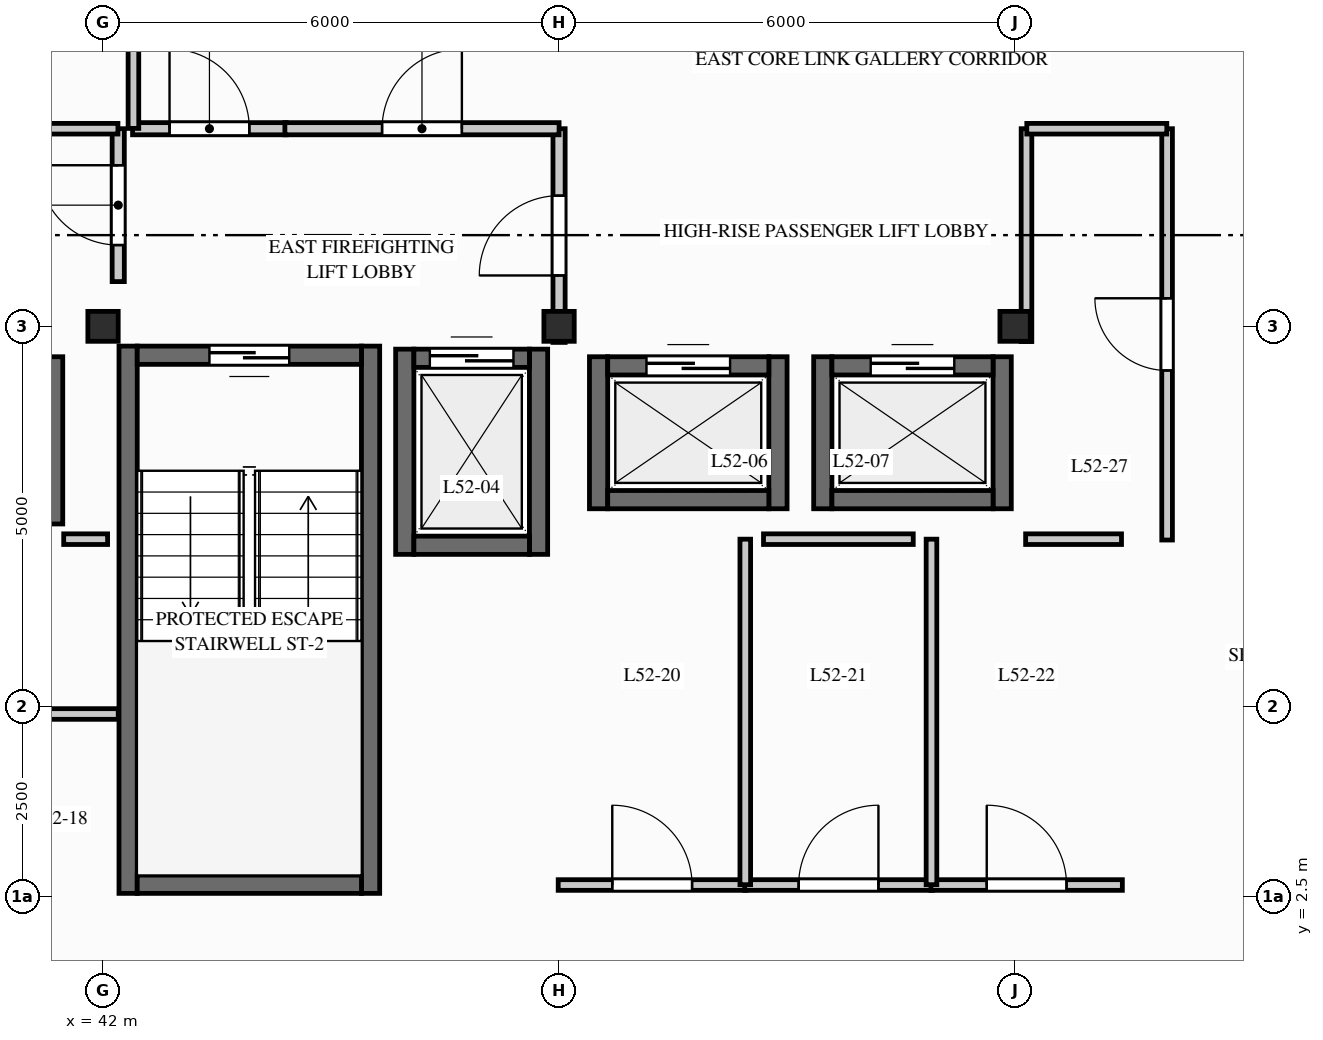
"""IFC4 building model, lengths in metres.
Left out: names, types, materials, properties, quantities, classifications, styles, units other than length and angle.
Written with IfcOpenShell. Run it as: python <this file> out.ifc"""

import sys

from ifc_helpers import new_model, si_unit, direction, frame, frame_2d, origin, origin_2d, place, context, subcontext, project, spatial, rectangle, i_section, extrude, element, fill, save


model = new_model("IFC4")
c1 = context("Model", 3, precision=1e-05, world=origin(), true_north=direction((0.0, 1.0)))
c2 = subcontext(c1, "Body", "Model", "MODEL_VIEW")
j1 = project(units=[si_unit("LENGTHUNIT", "METRE"), si_unit("PLANEANGLEUNIT", "RADIAN")], contexts=[c1])
p1 = place(None, origin())
s1 = spatial("IfcSite", under=j1, at=p1, CompositionType="ELEMENT")
p2 = place(p1, origin())
s2 = spatial("IfcBuilding", under=s1, at=p2, CompositionType="ELEMENT")
p3 = place(p2, frame((0.0, 0.0, 172.8)))
s3 = spatial("IfcBuildingStorey", under=s2, at=p3, CompositionType="ELEMENT", Elevation=172.8)
for number, where, z_axis, x_axis in (
    (1, (42.0, 10.0, 0.0), (0.0, 0.0, 1.0), (1.0, 0.0, 0.0)),
    (2, (48.0, 10.0, 0.0), (0.0, 0.0, 1.0), (1.0, 0.0, 0.0)),
    (3, (54.0, 10.0, 0.0), (0.0, 0.0, 1.0), (1.0, 0.0, 0.0)),
):
    element("IfcColumn", number, at=place(p3, frame(where, z_axis=z_axis, x_axis=x_axis)), inside=s3, PredefinedType="COLUMN", context=c2, shape_type="SweptSolid", body=[
        extrude(i_section(OverallWidth=0.399, OverallDepth=0.394, WebThickness=0.023, FlangeThickness=0.037, FilletRadius=0.015, at=origin_2d()), origin(), (0.0, 0.0, 1.0), 3.1),
    ])
for number, where, z_axis, x_axis in (
    (4, (42.33, 2.54, 0.0), (0.0, 0.0, 1.0), (0.0, 1.0, 0.0)),
    (5, (45.52, 2.54, 0.0), (0.0, 0.0, 1.0), (0.0, 1.0, 0.0)),
):
    element("IfcWall", number, at=place(p3, frame(where, z_axis=z_axis, x_axis=x_axis)), inside=s3, PredefinedType="SHEAR", context=c2, shape_type="SweptSolid", body=[
        extrude(rectangle(XDim=7.2, YDim=0.24, at=frame_2d((3.6, 0.0))), origin(), (0.0, 0.0, 1.0), 2.89),
    ])
p4 = place(p3, frame((42.45, 2.66, 0.0), z_axis=(0.0, 0.0, 1.0), x_axis=(1.0, 0.0, 0.0)))
e6 = element("IfcWall", 6, at=p4, inside=s3, PredefinedType="SHEAR", context=c2, shape_type="SweptSolid", body=[
    extrude(rectangle(XDim=2.95, YDim=0.24, at=frame_2d((1.475, 0.0))), origin(), (0.0, 0.0, 1.0), 2.89),
])
p5 = place(p3, frame((45.4, 9.62, 0.0), z_axis=(0.0, 0.0, 1.0), x_axis=(-1.0, 0.0, 0.0)))
e7 = element("IfcWall", 7, at=p5, inside=s3, PredefinedType="SHEAR", context=c2, shape_type="SweptSolid", body=[
    extrude(rectangle(XDim=2.95, YDim=0.24, at=frame_2d((1.475, 0.0))), origin(), (0.0, 0.0, 1.0), 2.89),
])
p6 = place(p5, frame((0.95, 0.0, 0.0)))
e8 = element("IfcOpeningElement", 8, at=p6, cuts=e7, PredefinedType="OPENING", context=c2, shape_type="SweptSolid", body=[
    extrude(rectangle(XDim=1.05, YDim=2.06, at=frame_2d((0.525, 1.03))), frame((0.0, 0.13, 0.0), z_axis=(0.0, -1.0, 0.0), x_axis=(1.0, 0.0, 0.0)), (0.0, 0.0, 1.0), 0.26),
])
for number, where, z_axis, x_axis in (
    (9, (45.97, 7.0, 0.0), (0.0, 0.0, 1.0), (0.0, 1.0, 0.0)),
    (10, (47.73, 7.0, 0.0), (0.0, 0.0, 1.0), (0.0, 1.0, 0.0)),
):
    element("IfcWall", number, at=place(p3, frame(where, z_axis=z_axis, x_axis=x_axis)), inside=s3, PredefinedType="SHEAR", context=c2, shape_type="SweptSolid", body=[
        extrude(rectangle(XDim=2.7, YDim=0.24, at=frame_2d((1.35, 0.0))), origin(), (0.0, 0.0, 1.0), 2.89),
    ])
p7 = place(p3, frame((46.09, 7.12, 0.0), z_axis=(0.0, 0.0, 1.0), x_axis=(1.0, 0.0, 0.0)))
e11 = element("IfcWall", 11, at=p7, inside=s3, PredefinedType="SHEAR", context=c2, shape_type="SweptSolid", body=[
    extrude(rectangle(XDim=1.52, YDim=0.24, at=frame_2d((0.76, 0.0))), origin(), (0.0, 0.0, 1.0), 2.89),
])
p8 = place(p3, frame((46.09, 9.58, 0.0), z_axis=(0.0, 0.0, 1.0), x_axis=(1.0, 0.0, 0.0)))
e12 = element("IfcWall", 12, at=p8, inside=s3, PredefinedType="SHEAR", context=c2, shape_type="SweptSolid", body=[
    extrude(rectangle(XDim=1.52, YDim=0.24, at=frame_2d((0.76, 0.0))), origin(), (0.0, 0.0, 1.0), 2.89),
])
p9 = place(p8, frame((0.21, 0.0, 0.0)))
e13 = element("IfcOpeningElement", 13, at=p9, cuts=e12, PredefinedType="OPENING", context=c2, shape_type="SweptSolid", body=[
    extrude(rectangle(XDim=1.1, YDim=2.06, at=frame_2d((0.55, 1.03))), frame((0.0, 0.13, 0.0), z_axis=(0.0, -1.0, 0.0), x_axis=(1.0, 0.0, 0.0)), (0.0, 0.0, 1.0), 0.26),
])
p10 = place(p3, frame((41.35, 7.4, 0.0), z_axis=(0.0, 0.0, 1.0), x_axis=(0.0, 1.0, 0.0)))
e14 = element("IfcWall", 14, at=p10, inside=s3, PredefinedType="SHEAR", context=c2, shape_type="SweptSolid", body=[
    extrude(rectangle(XDim=2.2, YDim=0.24, at=frame_2d((1.1, 0.0))), origin(), (0.0, 0.0, 1.0), 2.89),
])
for number, where, z_axis, x_axis in (
    (15, (48.52, 7.6, 0.0), (0.0, 0.0, 1.0), (0.0, 1.0, 0.0)),
    (16, (50.88, 7.6, 0.0), (0.0, 0.0, 1.0), (0.0, 1.0, 0.0)),
):
    element("IfcWall", number, at=place(p3, frame(where, z_axis=z_axis, x_axis=x_axis)), inside=s3, PredefinedType="SHEAR", context=c2, shape_type="SweptSolid", body=[
        extrude(rectangle(XDim=2.0, YDim=0.24, at=frame_2d((1.0, 0.0))), origin(), (0.0, 0.0, 1.0), 2.89),
    ])
p11 = place(p3, frame((48.64, 7.72, 0.0), z_axis=(0.0, 0.0, 1.0), x_axis=(1.0, 0.0, 0.0)))
e17 = element("IfcWall", 17, at=p11, inside=s3, PredefinedType="SHEAR", context=c2, shape_type="SweptSolid", body=[
    extrude(rectangle(XDim=2.12, YDim=0.24, at=frame_2d((1.06, 0.0))), origin(), (0.0, 0.0, 1.0), 2.89),
])
p12 = place(p3, frame((48.64, 9.48, 0.0), z_axis=(0.0, 0.0, 1.0), x_axis=(1.0, 0.0, 0.0)))
e18 = element("IfcWall", 18, at=p12, inside=s3, PredefinedType="SHEAR", context=c2, shape_type="SweptSolid", body=[
    extrude(rectangle(XDim=2.12, YDim=0.24, at=frame_2d((1.06, 0.0))), origin(), (0.0, 0.0, 1.0), 2.89),
])
p13 = place(p12, frame((0.51, 0.0, 0.0)))
e19 = element("IfcOpeningElement", 19, at=p13, cuts=e18, PredefinedType="OPENING", context=c2, shape_type="SweptSolid", body=[
    extrude(rectangle(XDim=1.1, YDim=2.06, at=frame_2d((0.55, 1.03))), frame((0.0, 0.13, 0.0), z_axis=(0.0, -1.0, 0.0), x_axis=(1.0, 0.0, 0.0)), (0.0, 0.0, 1.0), 0.26),
])
for number, where, z_axis, x_axis in (
    (20, (51.47, 7.6, 0.0), (0.0, 0.0, 1.0), (0.0, 1.0, 0.0)),
    (21, (53.83, 7.6, 0.0), (0.0, 0.0, 1.0), (0.0, 1.0, 0.0)),
):
    element("IfcWall", number, at=place(p3, frame(where, z_axis=z_axis, x_axis=x_axis)), inside=s3, PredefinedType="SHEAR", context=c2, shape_type="SweptSolid", body=[
        extrude(rectangle(XDim=2.0, YDim=0.24, at=frame_2d((1.0, 0.0))), origin(), (0.0, 0.0, 1.0), 2.89),
    ])
p14 = place(p3, frame((51.59, 7.72, 0.0), z_axis=(0.0, 0.0, 1.0), x_axis=(1.0, 0.0, 0.0)))
e22 = element("IfcWall", 22, at=p14, inside=s3, PredefinedType="SHEAR", context=c2, shape_type="SweptSolid", body=[
    extrude(rectangle(XDim=2.12, YDim=0.24, at=frame_2d((1.06, 0.0))), origin(), (0.0, 0.0, 1.0), 2.89),
])
p15 = place(p3, frame((51.59, 9.48, 0.0), z_axis=(0.0, 0.0, 1.0), x_axis=(1.0, 0.0, 0.0)))
e23 = element("IfcWall", 23, at=p15, inside=s3, PredefinedType="SHEAR", context=c2, shape_type="SweptSolid", body=[
    extrude(rectangle(XDim=2.12, YDim=0.24, at=frame_2d((1.06, 0.0))), origin(), (0.0, 0.0, 1.0), 2.89),
])
p16 = place(p15, frame((0.51, 0.0, 0.0)))
e24 = element("IfcOpeningElement", 24, at=p16, cuts=e23, PredefinedType="OPENING", context=c2, shape_type="SweptSolid", body=[
    extrude(rectangle(XDim=1.1, YDim=2.06, at=frame_2d((0.55, 1.03))), frame((0.0, 0.13, 0.0), z_axis=(0.0, -1.0, 0.0), x_axis=(1.0, 0.0, 0.0)), (0.0, 0.0, 1.0), 0.26),
])
p17 = place(p3, frame((56.0, 7.189, 0.0), z_axis=(0.0, 0.0, 1.0), x_axis=(0.0, 1.0, 0.0)))
e25 = element("IfcWall", 25, at=p17, inside=s3, PredefinedType="PARTITIONING", context=c2, shape_type="SweptSolid", body=[
    extrude(rectangle(XDim=5.411, YDim=0.14, at=frame_2d((2.706, 0.0))), origin(), (0.0, 0.0, 1.0), 2.253),
])
p18 = place(p17, frame((2.231, 0.0, 0.0)))
e26 = element("IfcOpeningElement", 26, at=p18, cuts=e25, PredefinedType="OPENING", context=c2, shape_type="SweptSolid", body=[
    extrude(rectangle(XDim=0.95, YDim=2.05, at=frame_2d((0.475, 1.025))), frame((0.0, 0.08, 0.0), z_axis=(0.0, -1.0, 0.0), x_axis=(1.0, 0.0, 0.0)), (0.0, 0.0, 1.0), 0.16),
])
p19 = place(p3, frame((47.989, 2.65, 0.0), z_axis=(0.0, 0.0, 1.0), x_axis=(1.0, 0.0, 0.0)))
e27 = element("IfcWall", 27, at=p19, inside=s3, PredefinedType="PARTITIONING", context=c2, shape_type="SweptSolid", body=[
    extrude(rectangle(XDim=2.472, YDim=0.14, at=frame_2d((1.236, 0.0))), origin(), (0.0, 0.0, 1.0), 2.253),
])
p20 = place(p19, frame((0.711, 0.0, 0.0)))
e28 = element("IfcOpeningElement", 28, at=p20, cuts=e27, PredefinedType="OPENING", context=c2, shape_type="SweptSolid", body=[
    extrude(rectangle(XDim=1.05, YDim=2.06, at=frame_2d((0.525, 1.03))), frame((0.0, 0.08, 0.0), z_axis=(0.0, -1.0, 0.0), x_axis=(1.0, 0.0, 0.0)), (0.0, 0.0, 1.0), 0.16),
])
p21 = place(p3, frame((50.443, 2.65, 0.0), z_axis=(0.0, 0.0, 1.0), x_axis=(1.0, 0.0, 0.0)))
e29 = element("IfcWall", 29, at=p21, inside=s3, PredefinedType="PARTITIONING", context=c2, shape_type="SweptSolid", body=[
    extrude(rectangle(XDim=2.469, YDim=0.14, at=frame_2d((1.234, 0.0))), origin(), (0.0, 0.0, 1.0), 2.89),
])
p22 = place(p21, frame((0.709, 0.0, 0.0)))
e30 = element("IfcOpeningElement", 30, at=p22, cuts=e29, PredefinedType="OPENING", context=c2, shape_type="SweptSolid", body=[
    extrude(rectangle(XDim=1.05, YDim=2.06, at=frame_2d((0.525, 1.03))), frame((0.0, 0.08, 0.0), z_axis=(0.0, -1.0, 0.0), x_axis=(1.0, 0.0, 0.0)), (0.0, 0.0, 1.0), 0.16),
])
p23 = place(p3, frame((52.893, 2.65, 0.0), z_axis=(0.0, 0.0, 1.0), x_axis=(1.0, 0.0, 0.0)))
e31 = element("IfcWall", 31, at=p23, inside=s3, PredefinedType="PARTITIONING", context=c2, shape_type="SweptSolid", body=[
    extrude(rectangle(XDim=2.519, YDim=0.14, at=frame_2d((1.259, 0.0))), origin(), (0.0, 0.0, 1.0), 2.253),
])
p24 = place(p23, frame((0.734, 0.0, 0.0)))
e32 = element("IfcOpeningElement", 32, at=p24, cuts=e31, PredefinedType="OPENING", context=c2, shape_type="SweptSolid", body=[
    extrude(rectangle(XDim=1.05, YDim=2.06, at=frame_2d((0.525, 1.03))), frame((0.0, 0.08, 0.0), z_axis=(0.0, -1.0, 0.0), x_axis=(1.0, 0.0, 0.0)), (0.0, 0.0, 1.0), 0.16),
])
p25 = place(p3, frame((38.454, 4.9, 0.0), z_axis=(0.0, 0.0, 1.0), x_axis=(1.0, 0.0, 0.0)))
e33 = element("IfcWall", 33, at=p25, inside=s3, PredefinedType="PARTITIONING", context=c2, shape_type="SweptSolid", body=[
    extrude(rectangle(XDim=3.746, YDim=0.14, at=frame_2d((1.873, 0.0))), origin(), (0.0, 0.0, 1.0), 2.253),
])
p26 = place(p25, frame((1.348, 0.0, 0.0)))
e34 = element("IfcOpeningElement", 34, at=p26, cuts=e33, PredefinedType="OPENING", context=c2, shape_type="SweptSolid", body=[
    extrude(rectangle(XDim=1.05, YDim=2.06, at=frame_2d((0.525, 1.03))), frame((0.0, 0.08, 0.0), z_axis=(0.0, -1.0, 0.0), x_axis=(1.0, 0.0, 0.0)), (0.0, 0.0, 1.0), 0.16),
])
for number, where, z_axis, x_axis in (
    (35, (50.45, 2.654, 0.0), (0.0, 0.0, 1.0), (0.0, 1.0, 0.0)),
    (36, (52.9, 2.654, 0.0), (0.0, 0.0, 1.0), (0.0, 1.0, 0.0)),
):
    element("IfcWall", number, at=place(p3, frame(where, z_axis=z_axis, x_axis=x_axis)), inside=s3, PredefinedType="PARTITIONING", context=c2, shape_type="SweptSolid", body=[
        extrude(rectangle(XDim=4.546, YDim=0.14, at=frame_2d((2.273, 0.0))), origin(), (0.0, 0.0, 1.0), 2.89),
    ])
p27 = place(p3, frame((54.139, 7.2, 0.0), z_axis=(0.0, 0.0, 1.0), x_axis=(1.0, 0.0, 0.0)))
e37 = element("IfcWall", 37, at=p27, inside=s3, PredefinedType="PARTITIONING", context=c2, shape_type="SweptSolid", body=[
    extrude(rectangle(XDim=1.261, YDim=0.14, at=frame_2d((0.631, 0.0))), origin(), (0.0, 0.0, 1.0), 2.253),
])
p28 = place(p3, frame((48.0, 9.789, 0.0), z_axis=(0.0, 0.0, 1.0), x_axis=(0.0, 1.0, 0.0)))
e38 = element("IfcWall", 38, at=p28, inside=s3, PredefinedType="PARTITIONING", context=c2, shape_type="SweptSolid", body=[
    extrude(rectangle(XDim=2.811, YDim=0.16, at=frame_2d((1.406, 0.0))), origin(), (0.0, 0.0, 1.0), 2.253),
])
p29 = place(p28, frame((0.881, 0.0, 0.0)))
e39 = element("IfcOpeningElement", 39, at=p29, cuts=e38, PredefinedType="OPENING", context=c2, shape_type="SweptSolid", body=[
    extrude(rectangle(XDim=1.05, YDim=2.06, at=frame_2d((0.525, 1.03))), frame((0.0, 0.09, 0.0), z_axis=(0.0, -1.0, 0.0), x_axis=(1.0, 0.0, 0.0)), (0.0, 0.0, 1.0), 0.18),
])
p30 = place(p3, frame((42.2, 10.589, 0.0), z_axis=(0.0, 0.0, 1.0), x_axis=(0.0, 1.0, 0.0)))
e40 = element("IfcWall", 40, at=p30, inside=s3, PredefinedType="PARTITIONING", context=c2, shape_type="SweptSolid", body=[
    extrude(rectangle(XDim=2.011, YDim=0.16, at=frame_2d((1.006, 0.0))), origin(), (0.0, 0.0, 1.0), 2.253),
])
p31 = place(p30, frame((0.481, 0.0, 0.0)))
e41 = element("IfcOpeningElement", 41, at=p31, cuts=e40, PredefinedType="OPENING", context=c2, shape_type="SweptSolid", body=[
    extrude(rectangle(XDim=1.05, YDim=2.06, at=frame_2d((0.525, 1.03))), frame((0.0, 0.09, 0.0), z_axis=(0.0, -1.0, 0.0), x_axis=(1.0, 0.0, 0.0)), (0.0, 0.0, 1.0), 0.18),
])
p32 = place(p3, frame((42.389, 12.6, 0.0), z_axis=(0.0, 0.0, 1.0), x_axis=(1.0, 0.0, 0.0)))
e42 = element("IfcWall", 42, at=p32, inside=s3, PredefinedType="PARTITIONING", context=c2, shape_type="SweptSolid", body=[
    extrude(rectangle(XDim=2.023, YDim=0.16, at=frame_2d((1.011, 0.0))), origin(), (0.0, 0.0, 1.0), 2.89),
])
p33 = place(p32, frame((0.486, 0.0, 0.0)))
e43 = element("IfcOpeningElement", 43, at=p33, cuts=e42, PredefinedType="OPENING", context=c2, shape_type="SweptSolid", body=[
    extrude(rectangle(XDim=1.05, YDim=2.06, at=frame_2d((0.525, 1.03))), frame((0.0, 0.09, 0.0), z_axis=(0.0, -1.0, 0.0), x_axis=(1.0, 0.0, 0.0)), (0.0, 0.0, 1.0), 0.18),
])
p34 = place(p3, frame((44.393, 12.6, 0.0), z_axis=(0.0, 0.0, 1.0), x_axis=(1.0, 0.0, 0.0)))
e44 = element("IfcWall", 44, at=p34, inside=s3, PredefinedType="PARTITIONING", context=c2, shape_type="SweptSolid", body=[
    extrude(rectangle(XDim=3.607, YDim=0.16, at=frame_2d((1.804, 0.0))), origin(), (0.0, 0.0, 1.0), 2.253),
])
p35 = place(p34, frame((1.279, 0.0, 0.0)))
e45 = element("IfcOpeningElement", 45, at=p35, cuts=e44, PredefinedType="OPENING", context=c2, shape_type="SweptSolid", body=[
    extrude(rectangle(XDim=1.05, YDim=2.06, at=frame_2d((0.525, 1.03))), frame((0.0, 0.09, 0.0), z_axis=(0.0, -1.0, 0.0), x_axis=(1.0, 0.0, 0.0)), (0.0, 0.0, 1.0), 0.18),
])
p36 = place(p3, frame((54.15, 9.8, 0.0), z_axis=(0.0, 0.0, 1.0), x_axis=(0.0, 1.0, 0.0)))
e46 = element("IfcWall", 46, at=p36, inside=s3, PredefinedType="PARTITIONING", context=c2, shape_type="SweptSolid", body=[
    extrude(rectangle(XDim=2.8, YDim=0.14, at=frame_2d((1.4, 0.0))), origin(), (0.0, 0.0, 1.0), 2.253),
])
p37 = place(p3, frame((54.154, 12.6, 0.0), z_axis=(0.0, 0.0, 1.0), x_axis=(1.0, 0.0, 0.0)))
e47 = element("IfcWall", 47, at=p37, inside=s3, PredefinedType="PARTITIONING", context=c2, shape_type="SweptSolid", body=[
    extrude(rectangle(XDim=1.842, YDim=0.14, at=frame_2d((0.921, 0.0))), origin(), (0.0, 0.0, 1.0), 2.89),
])
p38 = place(p3, frame((38.439, 12.6, 0.0), z_axis=(0.0, 0.0, 1.0), x_axis=(1.0, 0.0, 0.0)))
e48 = element("IfcWall", 48, at=p38, inside=s3, PredefinedType="PARTITIONING", context=c2, shape_type="SweptSolid", body=[
    extrude(rectangle(XDim=3.757, YDim=0.14, at=frame_2d((1.879, 0.0))), origin(), (0.0, 0.0, 1.0), 2.253),
])
p39 = place(p38, frame((1.404, 0.0, 0.0)))
e49 = element("IfcOpeningElement", 49, at=p39, cuts=e48, PredefinedType="OPENING", context=c2, shape_type="SweptSolid", body=[
    extrude(rectangle(XDim=0.95, YDim=2.05, at=frame_2d((0.475, 1.025))), frame((0.0, 0.08, 0.0), z_axis=(0.0, -1.0, 0.0), x_axis=(1.0, 0.0, 0.0)), (0.0, 0.0, 1.0), 0.16),
])
p40 = place(p3, frame((42.4, 12.604, 0.0), z_axis=(0.0, 0.0, 1.0), x_axis=(0.0, 1.0, 0.0)))
e50 = element("IfcWall", 50, at=p40, inside=s3, PredefinedType="PARTITIONING", context=c2, shape_type="SweptSolid", body=[
    extrude(rectangle(XDim=10.896, YDim=0.14, at=frame_2d((5.448, 0.0))), origin(), (0.0, 0.0, 1.0), 2.253),
])
p41 = place(p3, frame((41.483, 7.2, 0.0), z_axis=(0.0, 0.0, 1.0), x_axis=(1.0, 0.0, 0.0)))
e51 = element("IfcWall", 51, at=p41, inside=s3, PredefinedType="PARTITIONING", context=c2, shape_type="SweptSolid", body=[
    extrude(rectangle(XDim=0.577, YDim=0.14, at=frame_2d((0.289, 0.0))), origin(), (0.0, 0.0, 1.0), 2.253),
])
p42 = place(p3, frame((50.69, 7.2, 0.0), z_axis=(0.0, 0.0, 1.0), x_axis=(1.0, 0.0, 0.0)))
e52 = element("IfcWall", 52, at=p42, inside=s3, PredefinedType="PARTITIONING", context=c2, shape_type="SweptSolid", body=[
    extrude(rectangle(XDim=1.97, YDim=0.14, at=frame_2d((0.985, 0.0))), origin(), (0.0, 0.0, 1.0), 2.89),
])
p43 = place(p6, origin())
e53 = element("IfcDoor", 53, at=p43, inside=s3, OperationType="SINGLE_SWING_LEFT", PredefinedType="DOOR", context=c2, shape_type="SweptSolid", body=[
    extrude(rectangle(XDim=1.05, YDim=2.06, at=frame_2d((0.525, 1.03))), frame((0.0, 0.025, 0.0), z_axis=(0.0, -1.0, 0.0), x_axis=(1.0, 0.0, 0.0)), (0.0, 0.0, 1.0), 0.05),
])
fill(e8, e53)
p44 = place(p9, origin())
e54 = element("IfcDoor", 54, at=p44, inside=s3, OperationType="SLIDING_TO_LEFT", PredefinedType="DOOR", context=c2, shape_type="SweptSolid", body=[
    extrude(rectangle(XDim=1.1, YDim=2.06, at=frame_2d((0.55, 1.03))), frame((0.0, 0.025, 0.0), z_axis=(0.0, -1.0, 0.0), x_axis=(1.0, 0.0, 0.0)), (0.0, 0.0, 1.0), 0.05),
])
fill(e13, e54)
p45 = place(p13, origin())
e55 = element("IfcDoor", 55, at=p45, inside=s3, OperationType="SLIDING_TO_LEFT", PredefinedType="DOOR", context=c2, shape_type="SweptSolid", body=[
    extrude(rectangle(XDim=1.1, YDim=2.06, at=frame_2d((0.55, 1.03))), frame((0.0, 0.025, 0.0), z_axis=(0.0, -1.0, 0.0), x_axis=(1.0, 0.0, 0.0)), (0.0, 0.0, 1.0), 0.05),
])
fill(e19, e55)
p46 = place(p16, origin())
e56 = element("IfcDoor", 56, at=p46, inside=s3, OperationType="SLIDING_TO_RIGHT", PredefinedType="DOOR", context=c2, shape_type="SweptSolid", body=[
    extrude(rectangle(XDim=1.1, YDim=2.06, at=frame_2d((0.55, 1.03))), frame((0.0, 0.025, 0.0), z_axis=(0.0, -1.0, 0.0), x_axis=(1.0, 0.0, 0.0)), (0.0, 0.0, 1.0), 0.05),
])
fill(e24, e56)
p47 = place(p18, origin())
e57 = element("IfcDoor", 57, at=p47, inside=s3, OperationType="SINGLE_SWING_RIGHT", PredefinedType="DOOR", context=c2, shape_type="SweptSolid", body=[
    extrude(rectangle(XDim=0.95, YDim=2.05, at=frame_2d((0.475, 1.025))), frame((0.0, 0.025, 0.0), z_axis=(0.0, -1.0, 0.0), x_axis=(1.0, 0.0, 0.0)), (0.0, 0.0, 1.0), 0.05),
])
fill(e26, e57)
p48 = place(p20, origin())
e58 = element("IfcDoor", 58, at=p48, inside=s3, OperationType="SINGLE_SWING_LEFT", PredefinedType="DOOR", context=c2, shape_type="SweptSolid", body=[
    extrude(rectangle(XDim=1.05, YDim=2.06, at=frame_2d((0.525, 1.03))), frame((0.0, 0.025, 0.0), z_axis=(0.0, -1.0, 0.0), x_axis=(1.0, 0.0, 0.0)), (0.0, 0.0, 1.0), 0.05),
])
fill(e28, e58)
p49 = place(p22, origin())
e59 = element("IfcDoor", 59, at=p49, inside=s3, OperationType="SINGLE_SWING_RIGHT", PredefinedType="DOOR", context=c2, shape_type="SweptSolid", body=[
    extrude(rectangle(XDim=1.05, YDim=2.06, at=frame_2d((0.525, 1.03))), frame((0.0, 0.025, 0.0), z_axis=(0.0, -1.0, 0.0), x_axis=(1.0, 0.0, 0.0)), (0.0, 0.0, 1.0), 0.05),
])
fill(e30, e59)
p50 = place(p24, origin())
e60 = element("IfcDoor", 60, at=p50, inside=s3, OperationType="SINGLE_SWING_LEFT", PredefinedType="DOOR", context=c2, shape_type="SweptSolid", body=[
    extrude(rectangle(XDim=1.05, YDim=2.06, at=frame_2d((0.525, 1.03))), frame((0.0, 0.025, 0.0), z_axis=(0.0, -1.0, 0.0), x_axis=(1.0, 0.0, 0.0)), (0.0, 0.0, 1.0), 0.05),
])
fill(e32, e60)
p51 = place(p29, origin())
e61 = element("IfcDoor", 61, at=p51, inside=s3, OperationType="SINGLE_SWING_LEFT", PredefinedType="DOOR", context=c2, shape_type="SweptSolid", body=[
    extrude(rectangle(XDim=1.05, YDim=2.06, at=frame_2d((0.525, 1.03))), frame((0.0, 0.025, 0.0), z_axis=(0.0, -1.0, 0.0), x_axis=(1.0, 0.0, 0.0)), (0.0, 0.0, 1.0), 0.05),
])
fill(e39, e61)
p52 = place(p31, origin())
e62 = element("IfcDoor", 62, at=p52, inside=s3, OperationType="SINGLE_SWING_RIGHT", PredefinedType="DOOR", context=c2, shape_type="SweptSolid", body=[
    extrude(rectangle(XDim=1.05, YDim=2.06, at=frame_2d((0.525, 1.03))), frame((0.0, 0.025, 0.0), z_axis=(0.0, -1.0, 0.0), x_axis=(1.0, 0.0, 0.0)), (0.0, 0.0, 1.0), 0.05),
])
fill(e41, e62)
p53 = place(p33, origin())
e63 = element("IfcDoor", 63, at=p53, inside=s3, OperationType="SINGLE_SWING_LEFT", PredefinedType="DOOR", context=c2, shape_type="SweptSolid", body=[
    extrude(rectangle(XDim=1.05, YDim=2.06, at=frame_2d((0.525, 1.03))), frame((0.0, 0.025, 0.0), z_axis=(0.0, -1.0, 0.0), x_axis=(1.0, 0.0, 0.0)), (0.0, 0.0, 1.0), 0.05),
])
fill(e43, e63)
p54 = place(p35, origin())
e64 = element("IfcDoor", 64, at=p54, inside=s3, OperationType="SINGLE_SWING_RIGHT", PredefinedType="DOOR", context=c2, shape_type="SweptSolid", body=[
    extrude(rectangle(XDim=1.05, YDim=2.06, at=frame_2d((0.525, 1.03))), frame((0.0, 0.025, 0.0), z_axis=(0.0, -1.0, 0.0), x_axis=(1.0, 0.0, 0.0)), (0.0, 0.0, 1.0), 0.05),
])
fill(e45, e64)
save(model, sys.argv[1])
